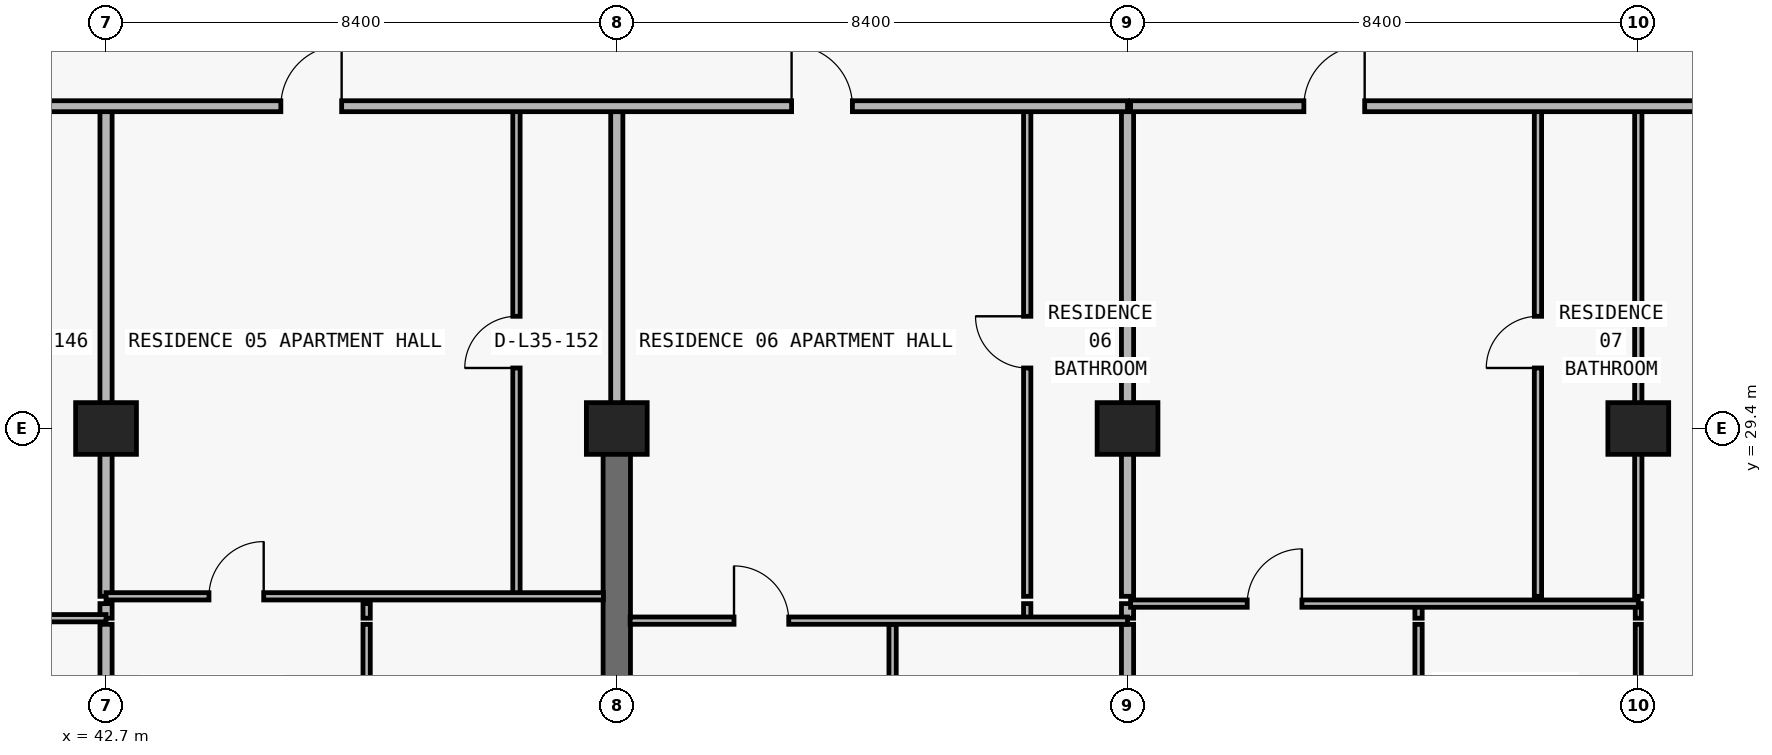
"""IFC4 building model, lengths in metres.
Left out: names, types, materials, properties, quantities, classifications, styles, units other than length and angle.
Written with IfcOpenShell. Run it as: python <this file> out.ifc"""

import sys

from ifc_helpers import new_model, si_unit, direction, frame, frame_2d, origin, origin_2d, place, context, subcontext, project, spatial, rectangle, extrude, element, fill, save


model = new_model("IFC4")
c1 = context("Model", 3, precision=1e-05, world=origin(), true_north=direction((0.0, 1.0)))
c2 = subcontext(c1, "Body", "Model", "MODEL_VIEW")
j1 = project(units=[si_unit("LENGTHUNIT", "METRE"), si_unit("PLANEANGLEUNIT", "RADIAN")], contexts=[c1])
p1 = place(None, origin())
s1 = spatial("IfcSite", under=j1, at=p1, CompositionType="ELEMENT")
p2 = place(p1, origin())
s2 = spatial("IfcBuilding", under=s1, at=p2, CompositionType="ELEMENT")
p3 = place(p2, frame((0.0, 0.0, 129.0)))
s3 = spatial("IfcBuildingStorey", under=s2, at=p3, CompositionType="ELEMENT", Elevation=129.0)
for number, where, z_axis, x_axis in (
    (1, (42.7, 29.4, 0.0), (0.0, 0.0, 1.0), (1.0, 0.0, 0.0)),
    (2, (51.1, 29.4, 0.0), (0.0, 0.0, 1.0), (1.0, 0.0, 0.0)),
    (3, (59.5, 29.4, 0.0), (0.0, 0.0, 1.0), (1.0, 0.0, 0.0)),
    (4, (67.9, 29.4, 0.0), (0.0, 0.0, 1.0), (1.0, 0.0, 0.0)),
):
    element("IfcColumn", number, at=place(p3, frame(where, z_axis=z_axis, x_axis=x_axis)), inside=s3, PredefinedType="COLUMN", context=c2, shape_type="SweptSolid", body=[
        extrude(rectangle(XDim=1.0, YDim=0.85, at=origin_2d()), origin(), (0.0, 0.0, 1.0), 3.05),
    ])
p4 = place(p3, frame((51.1, 20.8, 0.0), z_axis=(0.0, 0.0, 1.0), x_axis=(0.0, 1.0, 0.0)))
e5 = element("IfcWall", 5, at=p4, inside=s3, PredefinedType="SHEAR", context=c2, shape_type="SweptSolid", body=[
    extrude(rectangle(XDim=8.6, YDim=0.45, at=frame_2d((4.3, 0.0))), origin(), (0.0, 0.0, 1.0), 3.05),
])
p5 = place(p3, frame((42.7, 21.49, 0.0), z_axis=(0.0, 0.0, 1.0), x_axis=(0.0, 1.0, 0.0)))
e6 = element("IfcWall", 6, at=p5, inside=s3, PredefinedType="PARTITIONING", context=c2, shape_type="SweptSolid", body=[
    extrude(rectangle(XDim=4.69, YDim=0.2, at=frame_2d((2.345, 0.0))), origin(), (0.0, 0.0, 1.0), 2.174),
])
p6 = place(p3, frame((42.7, 26.28, 0.0), z_axis=(0.0, 0.0, 1.0), x_axis=(0.0, 1.0, 0.0)))
e7 = element("IfcWall", 7, at=p6, inside=s3, PredefinedType="PARTITIONING", context=c2, shape_type="SweptSolid", body=[
    extrude(rectangle(XDim=0.24, YDim=0.2, at=frame_2d((0.12, 0.0))), origin(), (0.0, 0.0, 1.0), 2.174),
])
p7 = place(p3, frame((42.7, 26.64, 0.0), z_axis=(0.0, 0.0, 1.0), x_axis=(0.0, 1.0, 0.0)))
e8 = element("IfcWall", 8, at=p7, inside=s3, PredefinedType="PARTITIONING", context=c2, shape_type="SweptSolid", body=[
    extrude(rectangle(XDim=8.06, YDim=0.2, at=frame_2d((4.03, 0.0))), origin(), (0.0, 0.0, 1.0), 2.174),
])
p8 = place(p3, frame((46.986, 21.49, 0.0), z_axis=(0.0, 0.0, 1.0), x_axis=(0.0, 1.0, 0.0)))
e9 = element("IfcWall", 9, at=p8, inside=s3, PredefinedType="PARTITIONING", context=c2, shape_type="SweptSolid", body=[
    extrude(rectangle(XDim=4.69, YDim=0.12, at=frame_2d((2.345, 0.0))), origin(), (0.0, 0.0, 1.0), 3.05),
])
p9 = place(p8, frame((1.895, 0.0, 0.0)))
e10 = element("IfcOpeningElement", 10, at=p9, cuts=e9, PredefinedType="OPENING", context=c2, shape_type="SweptSolid", body=[
    extrude(rectangle(XDim=0.9, YDim=2.15, at=frame_2d((0.45, 1.075))), frame((0.0, 0.07, 0.0), z_axis=(0.0, -1.0, 0.0), x_axis=(1.0, 0.0, 0.0)), (0.0, 0.0, 1.0), 0.14),
])
p10 = place(p3, frame((46.986, 26.28, 0.0), z_axis=(0.0, 0.0, 1.0), x_axis=(0.0, 1.0, 0.0)))
e11 = element("IfcWall", 11, at=p10, inside=s3, PredefinedType="PARTITIONING", context=c2, shape_type="SweptSolid", body=[
    extrude(rectangle(XDim=0.24, YDim=0.12, at=frame_2d((0.12, 0.0))), origin(), (0.0, 0.0, 1.0), 3.05),
])
p11 = place(p3, frame((49.45, 26.64, 0.0), z_axis=(0.0, 0.0, 1.0), x_axis=(0.0, 1.0, 0.0)))
e12 = element("IfcWall", 12, at=p11, inside=s3, PredefinedType="PARTITIONING", context=c2, shape_type="SweptSolid", body=[
    extrude(rectangle(XDim=8.06, YDim=0.12, at=frame_2d((4.03, 0.0))), origin(), (0.0, 0.0, 1.0), 3.05),
])
p12 = place(p11, frame((3.755, 0.0, 0.0)))
e13 = element("IfcOpeningElement", 13, at=p12, cuts=e12, PredefinedType="OPENING", context=c2, shape_type="SweptSolid", body=[
    extrude(rectangle(XDim=0.85, YDim=2.1, at=frame_2d((0.425, 1.05))), frame((0.0, 0.07, 0.0), z_axis=(0.0, -1.0, 0.0), x_axis=(1.0, 0.0, 0.0)), (0.0, 0.0, 1.0), 0.14),
])
p13 = place(p3, frame((51.1, 29.405, 0.0), z_axis=(0.0, 0.0, 1.0), x_axis=(0.0, 1.0, 0.0)))
e14 = element("IfcWall", 14, at=p13, inside=s3, PredefinedType="PARTITIONING", context=c2, shape_type="SweptSolid", body=[
    extrude(rectangle(XDim=5.295, YDim=0.2, at=frame_2d((2.647, 0.0))), origin(), (0.0, 0.0, 1.0), 2.335),
])
p14 = place(p3, frame((55.636, 21.49, 0.0), z_axis=(0.0, 0.0, 1.0), x_axis=(0.0, 1.0, 0.0)))
e15 = element("IfcWall", 15, at=p14, inside=s3, PredefinedType="PARTITIONING", context=c2, shape_type="SweptSolid", body=[
    extrude(rectangle(XDim=4.69, YDim=0.12, at=frame_2d((2.345, 0.0))), origin(), (0.0, 0.0, 1.0), 3.05),
])
p15 = place(p14, frame((1.895, 0.0, 0.0)))
e16 = element("IfcOpeningElement", 16, at=p15, cuts=e15, PredefinedType="OPENING", context=c2, shape_type="SweptSolid", body=[
    extrude(rectangle(XDim=0.9, YDim=2.15, at=frame_2d((0.45, 1.075))), frame((0.0, 0.07, 0.0), z_axis=(0.0, -1.0, 0.0), x_axis=(1.0, 0.0, 0.0)), (0.0, 0.0, 1.0), 0.14),
])
p16 = place(p3, frame((57.85, 26.28, 0.0), z_axis=(0.0, 0.0, 1.0), x_axis=(0.0, 1.0, 0.0)))
e17 = element("IfcWall", 17, at=p16, inside=s3, PredefinedType="PARTITIONING", context=c2, shape_type="SweptSolid", body=[
    extrude(rectangle(XDim=0.24, YDim=0.12, at=frame_2d((0.12, 0.0))), origin(), (0.0, 0.0, 1.0), 3.05),
])
p17 = place(p3, frame((57.85, 26.64, 0.0), z_axis=(0.0, 0.0, 1.0), x_axis=(0.0, 1.0, 0.0)))
e18 = element("IfcWall", 18, at=p17, inside=s3, PredefinedType="PARTITIONING", context=c2, shape_type="SweptSolid", body=[
    extrude(rectangle(XDim=8.06, YDim=0.12, at=frame_2d((4.03, 0.0))), origin(), (0.0, 0.0, 1.0), 3.05),
])
p18 = place(p17, frame((3.755, 0.0, 0.0)))
e19 = element("IfcOpeningElement", 19, at=p18, cuts=e18, PredefinedType="OPENING", context=c2, shape_type="SweptSolid", body=[
    extrude(rectangle(XDim=0.85, YDim=2.1, at=frame_2d((0.425, 1.05))), frame((0.0, 0.07, 0.0), z_axis=(0.0, -1.0, 0.0), x_axis=(1.0, 0.0, 0.0)), (0.0, 0.0, 1.0), 0.14),
])
p19 = place(p3, frame((59.5, 21.49, 0.0), z_axis=(0.0, 0.0, 1.0), x_axis=(0.0, 1.0, 0.0)))
e20 = element("IfcWall", 20, at=p19, inside=s3, PredefinedType="PARTITIONING", context=c2, shape_type="SweptSolid", body=[
    extrude(rectangle(XDim=4.69, YDim=0.2, at=frame_2d((2.345, 0.0))), origin(), (0.0, 0.0, 1.0), 2.174),
])
p20 = place(p3, frame((59.5, 26.28, 0.0), z_axis=(0.0, 0.0, 1.0), x_axis=(0.0, 1.0, 0.0)))
e21 = element("IfcWall", 21, at=p20, inside=s3, PredefinedType="PARTITIONING", context=c2, shape_type="SweptSolid", body=[
    extrude(rectangle(XDim=0.24, YDim=0.2, at=frame_2d((0.12, 0.0))), origin(), (0.0, 0.0, 1.0), 2.174),
])
p21 = place(p3, frame((59.5, 26.64, 0.0), z_axis=(0.0, 0.0, 1.0), x_axis=(0.0, 1.0, 0.0)))
e22 = element("IfcWall", 22, at=p21, inside=s3, PredefinedType="PARTITIONING", context=c2, shape_type="SweptSolid", body=[
    extrude(rectangle(XDim=8.06, YDim=0.2, at=frame_2d((4.03, 0.0))), origin(), (0.0, 0.0, 1.0), 2.174),
])
p22 = place(p3, frame((64.286, 21.49, 0.0), z_axis=(0.0, 0.0, 1.0), x_axis=(0.0, 1.0, 0.0)))
e23 = element("IfcWall", 23, at=p22, inside=s3, PredefinedType="PARTITIONING", context=c2, shape_type="SweptSolid", body=[
    extrude(rectangle(XDim=4.69, YDim=0.12, at=frame_2d((2.345, 0.0))), origin(), (0.0, 0.0, 1.0), 3.05),
])
p23 = place(p22, frame((1.895, 0.0, 0.0)))
e24 = element("IfcOpeningElement", 24, at=p23, cuts=e23, PredefinedType="OPENING", context=c2, shape_type="SweptSolid", body=[
    extrude(rectangle(XDim=0.9, YDim=2.15, at=frame_2d((0.45, 1.075))), frame((0.0, 0.07, 0.0), z_axis=(0.0, -1.0, 0.0), x_axis=(1.0, 0.0, 0.0)), (0.0, 0.0, 1.0), 0.14),
])
p24 = place(p3, frame((64.286, 26.28, 0.0), z_axis=(0.0, 0.0, 1.0), x_axis=(0.0, 1.0, 0.0)))
e25 = element("IfcWall", 25, at=p24, inside=s3, PredefinedType="PARTITIONING", context=c2, shape_type="SweptSolid", body=[
    extrude(rectangle(XDim=0.24, YDim=0.12, at=frame_2d((0.12, 0.0))), origin(), (0.0, 0.0, 1.0), 3.05),
])
p25 = place(p3, frame((66.25, 26.64, 0.0), z_axis=(0.0, 0.0, 1.0), x_axis=(0.0, 1.0, 0.0)))
e26 = element("IfcWall", 26, at=p25, inside=s3, PredefinedType="PARTITIONING", context=c2, shape_type="SweptSolid", body=[
    extrude(rectangle(XDim=8.06, YDim=0.12, at=frame_2d((4.03, 0.0))), origin(), (0.0, 0.0, 1.0), 3.05),
])
p26 = place(p25, frame((3.755, 0.0, 0.0)))
e27 = element("IfcOpeningElement", 27, at=p26, cuts=e26, PredefinedType="OPENING", context=c2, shape_type="SweptSolid", body=[
    extrude(rectangle(XDim=0.85, YDim=2.1, at=frame_2d((0.425, 1.05))), frame((0.0, 0.07, 0.0), z_axis=(0.0, -1.0, 0.0), x_axis=(1.0, 0.0, 0.0)), (0.0, 0.0, 1.0), 0.14),
])
p27 = place(p3, frame((67.9, 21.49, 0.0), z_axis=(0.0, 0.0, 1.0), x_axis=(0.0, 1.0, 0.0)))
e28 = element("IfcWall", 28, at=p27, inside=s3, PredefinedType="MOVABLE", context=c2, shape_type="SweptSolid", body=[
    extrude(rectangle(XDim=4.69, YDim=0.1, at=frame_2d((2.345, 0.0))), origin(), (0.0, 0.0, 1.0), 2.174),
])
p28 = place(p27, frame((1.895, 0.0, 0.0)))
e29 = element("IfcOpeningElement", 29, at=p28, cuts=e28, PredefinedType="OPENING", context=c2, shape_type="SweptSolid", body=[
    extrude(rectangle(XDim=0.9, YDim=2.124, at=frame_2d((0.45, 1.062))), frame((0.0, 0.06, 0.0), z_axis=(0.0, -1.0, 0.0), x_axis=(1.0, 0.0, 0.0)), (0.0, 0.0, 1.0), 0.12),
])
p29 = place(p3, frame((67.9, 26.28, 0.0), z_axis=(0.0, 0.0, 1.0), x_axis=(0.0, 1.0, 0.0)))
e30 = element("IfcWall", 30, at=p29, inside=s3, PredefinedType="MOVABLE", context=c2, shape_type="SweptSolid", body=[
    extrude(rectangle(XDim=0.24, YDim=0.1, at=frame_2d((0.12, 0.0))), origin(), (0.0, 0.0, 1.0), 2.174),
])
p30 = place(p3, frame((67.9, 26.64, 0.0), z_axis=(0.0, 0.0, 1.0), x_axis=(0.0, 1.0, 0.0)))
e31 = element("IfcWall", 31, at=p30, inside=s3, PredefinedType="PARTITIONING", context=c2, shape_type="SweptSolid", body=[
    extrude(rectangle(XDim=8.06, YDim=0.12, at=frame_2d((4.03, 0.0))), origin(), (0.0, 0.0, 1.0), 2.174),
])
p31 = place(p3, frame((51.32, 26.24, 0.0), z_axis=(0.0, 0.0, 1.0), x_axis=(1.0, 0.0, 0.0)))
e32 = element("IfcWall", 32, at=p31, inside=s3, PredefinedType="PARTITIONING", context=c2, shape_type="SweptSolid", body=[
    extrude(rectangle(XDim=8.18, YDim=0.12, at=frame_2d((4.09, 0.0))), origin(), (0.0, 0.0, 1.0), 3.05),
])
p32 = place(p31, frame((1.708, 0.0, 0.0)))
e33 = element("IfcOpeningElement", 33, at=p32, cuts=e32, PredefinedType="OPENING", context=c2, shape_type="SweptSolid", body=[
    extrude(rectangle(XDim=0.9, YDim=2.15, at=frame_2d((0.45, 1.075))), frame((0.0, 0.07, 0.0), z_axis=(0.0, -1.0, 0.0), x_axis=(1.0, 0.0, 0.0)), (0.0, 0.0, 1.0), 0.14),
])
p33 = place(p3, frame((35.1, 26.28, 0.0), z_axis=(0.0, 0.0, 1.0), x_axis=(1.0, 0.0, 0.0)))
e34 = element("IfcWall", 34, at=p33, inside=s3, PredefinedType="PARTITIONING", context=c2, shape_type="SweptSolid", body=[
    extrude(rectangle(XDim=7.6, YDim=0.12, at=frame_2d((3.8, 0.0))), origin(), (0.0, 0.0, 1.0), 3.05),
])
p34 = place(p33, frame((1.727, 0.0, 0.0)))
e35 = element("IfcOpeningElement", 35, at=p34, cuts=e34, PredefinedType="OPENING", context=c2, shape_type="SweptSolid", body=[
    extrude(rectangle(XDim=0.9, YDim=2.15, at=frame_2d((0.45, 1.075))), frame((0.0, 0.07, 0.0), z_axis=(0.0, -1.0, 0.0), x_axis=(1.0, 0.0, 0.0)), (0.0, 0.0, 1.0), 0.14),
])
p35 = place(p3, frame((59.55, 26.52, 0.0), z_axis=(0.0, 0.0, 1.0), x_axis=(1.0, 0.0, 0.0)))
e36 = element("IfcWall", 36, at=p35, inside=s3, PredefinedType="PARTITIONING", context=c2, shape_type="SweptSolid", body=[
    extrude(rectangle(XDim=8.35, YDim=0.12, at=frame_2d((4.175, 0.0))), origin(), (0.0, 0.0, 1.0), 3.05),
])
p36 = place(p35, frame((1.918, 0.0, 0.0)))
e37 = element("IfcOpeningElement", 37, at=p36, cuts=e36, PredefinedType="OPENING", context=c2, shape_type="SweptSolid", body=[
    extrude(rectangle(XDim=0.9, YDim=2.15, at=frame_2d((0.45, 1.075))), frame((0.0, 0.07, 0.0), z_axis=(0.0, -1.0, 0.0), x_axis=(1.0, 0.0, 0.0)), (0.0, 0.0, 1.0), 0.14),
])
p37 = place(p3, frame((42.7, 26.64, 0.0), z_axis=(0.0, 0.0, 1.0), x_axis=(1.0, 0.0, 0.0)))
e38 = element("IfcWall", 38, at=p37, inside=s3, PredefinedType="PARTITIONING", context=c2, shape_type="SweptSolid", body=[
    extrude(rectangle(XDim=8.18, YDim=0.12, at=frame_2d((4.09, 0.0))), origin(), (0.0, 0.0, 1.0), 3.05),
])
p38 = place(p37, frame((1.693, 0.0, 0.0)))
e39 = element("IfcOpeningElement", 39, at=p38, cuts=e38, PredefinedType="OPENING", context=c2, shape_type="SweptSolid", body=[
    extrude(rectangle(XDim=0.9, YDim=2.15, at=frame_2d((0.45, 1.075))), frame((0.0, 0.07, 0.0), z_axis=(0.0, -1.0, 0.0), x_axis=(1.0, 0.0, 0.0)), (0.0, 0.0, 1.0), 0.14),
])
p39 = place(p3, frame((26.7, 34.7, 0.0), z_axis=(0.0, 0.0, 1.0), x_axis=(1.0, 0.0, 0.0)))
e40 = element("IfcWall", 40, at=p39, inside=s3, PredefinedType="PARTITIONING", context=c2, shape_type="SweptSolid", body=[
    extrude(rectangle(XDim=32.8, YDim=0.18, at=frame_2d((16.4, 0.0))), origin(), (0.0, 0.0, 1.0), 3.05),
])
p40 = place(p39, frame((2.875, 0.0, 0.0)))
e41 = element("IfcOpeningElement", 41, at=p40, cuts=e40, PredefinedType="OPENING", context=c2, shape_type="SweptSolid", body=[
    extrude(rectangle(XDim=1.0, YDim=2.2, at=frame_2d((0.5, 1.1))), frame((0.0, 0.1, 0.0), z_axis=(0.0, -1.0, 0.0), x_axis=(1.0, 0.0, 0.0)), (0.0, 0.0, 1.0), 0.2),
])
p41 = place(p39, frame((10.875, 0.0, 0.0)))
e42 = element("IfcOpeningElement", 42, at=p41, cuts=e40, PredefinedType="OPENING", context=c2, shape_type="SweptSolid", body=[
    extrude(rectangle(XDim=1.0, YDim=2.2, at=frame_2d((0.5, 1.1))), frame((0.0, 0.1, 0.0), z_axis=(0.0, -1.0, 0.0), x_axis=(1.0, 0.0, 0.0)), (0.0, 0.0, 1.0), 0.2),
])
p42 = place(p39, frame((18.875, 0.0, 0.0)))
e43 = element("IfcOpeningElement", 43, at=p42, cuts=e40, PredefinedType="OPENING", context=c2, shape_type="SweptSolid", body=[
    extrude(rectangle(XDim=1.0, YDim=2.2, at=frame_2d((0.5, 1.1))), frame((0.0, 0.1, 0.0), z_axis=(0.0, -1.0, 0.0), x_axis=(1.0, 0.0, 0.0)), (0.0, 0.0, 1.0), 0.2),
])
p43 = place(p39, frame((27.275, 0.0, 0.0)))
e44 = element("IfcOpeningElement", 44, at=p43, cuts=e40, PredefinedType="OPENING", context=c2, shape_type="SweptSolid", body=[
    extrude(rectangle(XDim=1.0, YDim=2.2, at=frame_2d((0.5, 1.1))), frame((0.0, 0.1, 0.0), z_axis=(0.0, -1.0, 0.0), x_axis=(1.0, 0.0, 0.0)), (0.0, 0.0, 1.0), 0.2),
])
p44 = place(p3, frame((59.55, 34.7, 0.0), z_axis=(0.0, 0.0, 1.0), x_axis=(1.0, 0.0, 0.0)))
e45 = element("IfcWall", 45, at=p44, inside=s3, PredefinedType="PARTITIONING", context=c2, shape_type="SweptSolid", body=[
    extrude(rectangle(XDim=10.55, YDim=0.18, at=frame_2d((5.275, 0.0))), origin(), (0.0, 0.0, 1.0), 3.05),
])
p45 = place(p44, frame((2.85, 0.0, 0.0)))
e46 = element("IfcOpeningElement", 46, at=p45, cuts=e45, PredefinedType="OPENING", context=c2, shape_type="SweptSolid", body=[
    extrude(rectangle(XDim=1.0, YDim=2.2, at=frame_2d((0.5, 1.1))), frame((0.0, 0.1, 0.0), z_axis=(0.0, -1.0, 0.0), x_axis=(1.0, 0.0, 0.0)), (0.0, 0.0, 1.0), 0.2),
])
p46 = place(p42, origin())
e47 = element("IfcDoor", 47, at=p46, inside=s3, OperationType="SINGLE_SWING_RIGHT", PredefinedType="DOOR", context=c2, shape_type="SweptSolid", body=[
    extrude(rectangle(XDim=1.0, YDim=2.2, at=frame_2d((0.5, 1.1))), frame((0.0, 0.025, 0.0), z_axis=(0.0, -1.0, 0.0), x_axis=(1.0, 0.0, 0.0)), (0.0, 0.0, 1.0), 0.05),
])
fill(e43, e47)
p47 = place(p12, origin())
e48 = element("IfcDoor", 48, at=p47, inside=s3, OperationType="SINGLE_SWING_LEFT", PredefinedType="DOOR", context=c2, shape_type="SweptSolid", body=[
    extrude(rectangle(XDim=0.85, YDim=2.1, at=frame_2d((0.425, 1.05))), frame((0.0, 0.025, 0.0), z_axis=(0.0, -1.0, 0.0), x_axis=(1.0, 0.0, 0.0)), (0.0, 0.0, 1.0), 0.05),
])
fill(e13, e48)
p48 = place(p38, origin())
e49 = element("IfcDoor", 49, at=p48, inside=s3, OperationType="SINGLE_SWING_RIGHT", PredefinedType="DOOR", context=c2, shape_type="SweptSolid", body=[
    extrude(rectangle(XDim=0.9, YDim=2.15, at=frame_2d((0.45, 1.075))), frame((0.0, 0.025, 0.0), z_axis=(0.0, -1.0, 0.0), x_axis=(1.0, 0.0, 0.0)), (0.0, 0.0, 1.0), 0.05),
])
fill(e39, e49)
p49 = place(p43, origin())
e50 = element("IfcDoor", 50, at=p49, inside=s3, OperationType="SINGLE_SWING_LEFT", PredefinedType="DOOR", context=c2, shape_type="SweptSolid", body=[
    extrude(rectangle(XDim=1.0, YDim=2.2, at=frame_2d((0.5, 1.1))), frame((0.0, 0.025, 0.0), z_axis=(0.0, -1.0, 0.0), x_axis=(1.0, 0.0, 0.0)), (0.0, 0.0, 1.0), 0.05),
])
fill(e44, e50)
p50 = place(p18, origin())
e51 = element("IfcDoor", 51, at=p50, inside=s3, OperationType="SINGLE_SWING_RIGHT", PredefinedType="DOOR", context=c2, shape_type="SweptSolid", body=[
    extrude(rectangle(XDim=0.85, YDim=2.1, at=frame_2d((0.425, 1.05))), frame((0.0, 0.025, 0.0), z_axis=(0.0, -1.0, 0.0), x_axis=(1.0, 0.0, 0.0)), (0.0, 0.0, 1.0), 0.05),
])
fill(e19, e51)
p51 = place(p32, origin())
e52 = element("IfcDoor", 52, at=p51, inside=s3, OperationType="SINGLE_SWING_LEFT", PredefinedType="DOOR", context=c2, shape_type="SweptSolid", body=[
    extrude(rectangle(XDim=0.9, YDim=2.15, at=frame_2d((0.45, 1.075))), frame((0.0, 0.025, 0.0), z_axis=(0.0, -1.0, 0.0), x_axis=(1.0, 0.0, 0.0)), (0.0, 0.0, 1.0), 0.05),
])
fill(e33, e52)
p52 = place(p45, origin())
e53 = element("IfcDoor", 53, at=p52, inside=s3, OperationType="SINGLE_SWING_RIGHT", PredefinedType="DOOR", context=c2, shape_type="SweptSolid", body=[
    extrude(rectangle(XDim=1.0, YDim=2.2, at=frame_2d((0.5, 1.1))), frame((0.0, 0.025, 0.0), z_axis=(0.0, -1.0, 0.0), x_axis=(1.0, 0.0, 0.0)), (0.0, 0.0, 1.0), 0.05),
])
fill(e46, e53)
p53 = place(p26, origin())
e54 = element("IfcDoor", 54, at=p53, inside=s3, OperationType="SINGLE_SWING_LEFT", PredefinedType="DOOR", context=c2, shape_type="SweptSolid", body=[
    extrude(rectangle(XDim=0.85, YDim=2.1, at=frame_2d((0.425, 1.05))), frame((0.0, 0.025, 0.0), z_axis=(0.0, -1.0, 0.0), x_axis=(1.0, 0.0, 0.0)), (0.0, 0.0, 1.0), 0.05),
])
fill(e27, e54)
p54 = place(p36, origin())
e55 = element("IfcDoor", 55, at=p54, inside=s3, OperationType="SINGLE_SWING_RIGHT", PredefinedType="DOOR", context=c2, shape_type="SweptSolid", body=[
    extrude(rectangle(XDim=0.9, YDim=2.15, at=frame_2d((0.45, 1.075))), frame((0.0, 0.025, 0.0), z_axis=(0.0, -1.0, 0.0), x_axis=(1.0, 0.0, 0.0)), (0.0, 0.0, 1.0), 0.05),
])
fill(e37, e55)
save(model, sys.argv[1])
